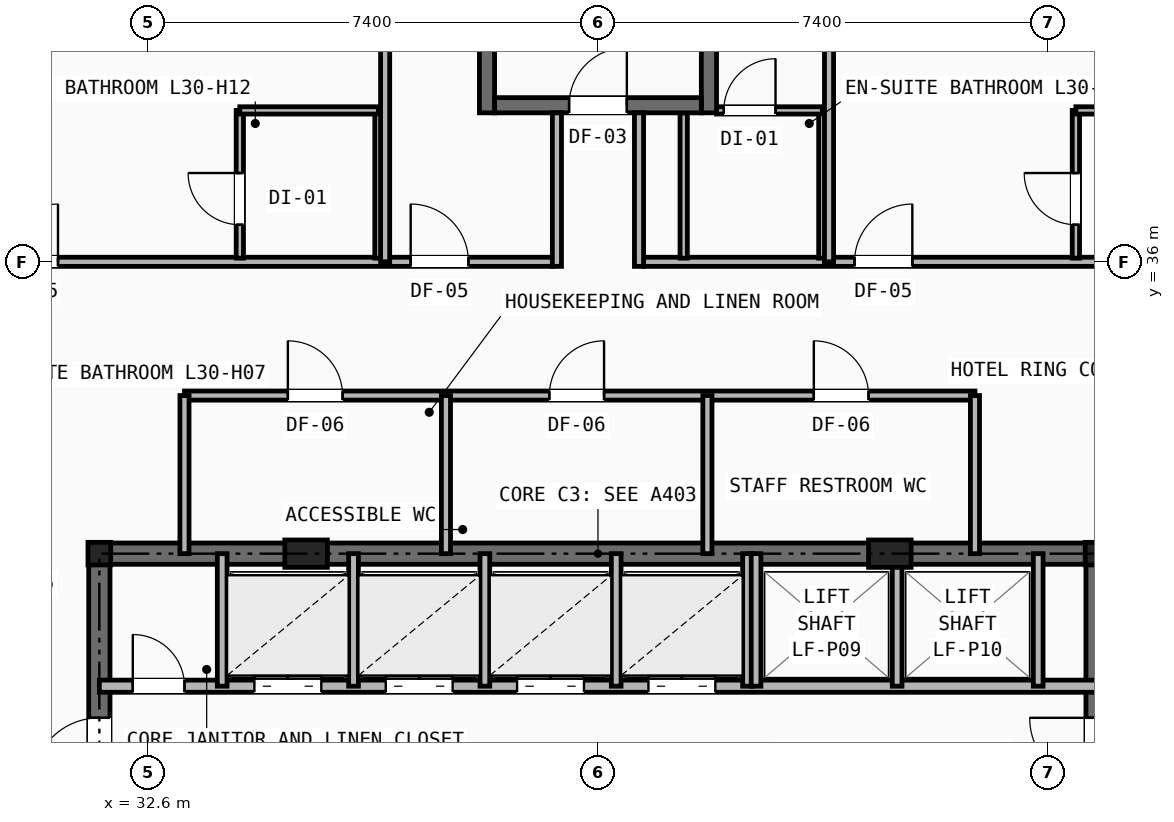
"""IFC4 building model, lengths in metres.
Left out: names, types, materials, properties, quantities, classifications, styles, units other than length and angle.
Written with IfcOpenShell. Run it as: python <this file> out.ifc"""

import sys

from ifc_helpers import new_model, si_unit, direction, frame, frame_2d, origin, origin_2d, place, context, subcontext, project, spatial, rectangle, i_section, extrude, element, fill, save


model = new_model("IFC4")
c1 = context("Model", 3, precision=1e-05, world=origin(), true_north=direction((0.0, 1.0)))
c2 = subcontext(c1, "Body", "Model", "MODEL_VIEW")
j1 = project(units=[si_unit("LENGTHUNIT", "METRE"), si_unit("PLANEANGLEUNIT", "RADIAN")], contexts=[c1])
p1 = place(None, origin())
s1 = spatial("IfcSite", under=j1, at=p1, CompositionType="ELEMENT")
p2 = place(p1, origin())
s2 = spatial("IfcBuilding", under=s1, at=p2, CompositionType="ELEMENT")
p3 = place(p2, frame((0.0, 0.0, 105.4)))
s3 = spatial("IfcBuildingStorey", under=s2, at=p3, CompositionType="ELEMENT", Elevation=105.4)
for number, where, z_axis, x_axis in (
    (1, (31.8, 31.2, 0.0), (0.0, 0.0, 1.0), (1.0, 0.0, 0.0)),
    (2, (48.2, 31.2, 0.0), (0.0, 0.0, 1.0), (1.0, 0.0, 0.0)),
):
    element("IfcColumn", number, at=place(p3, frame(where, z_axis=z_axis, x_axis=x_axis)), inside=s3, PredefinedType="COLUMN", context=c2, shape_type="SweptSolid", body=[
        extrude(i_section(OverallWidth=0.374, OverallDepth=0.372, WebThickness=0.016, FlangeThickness=0.026, at=origin_2d()), origin(), (0.0, 0.0, 1.0), 3.2),
    ])
for number, where, z_axis, x_axis in (
    (3, (35.2, 31.2, 0.0), (0.0, 0.0, 1.0), (1.0, 0.0, 0.0)),
    (4, (44.8, 31.2, 0.0), (0.0, 0.0, 1.0), (1.0, 0.0, 0.0)),
):
    element("IfcColumn", number, at=place(p3, frame(where, z_axis=z_axis, x_axis=x_axis)), inside=s3, PredefinedType="PILASTER", context=c2, shape_type="SweptSolid", body=[
        extrude(rectangle(XDim=0.7, YDim=0.45, at=origin_2d()), origin(), (0.0, 0.0, 1.0), 3.2),
    ])
p4 = place(p3, frame((31.8, 31.2, 0.0), z_axis=(0.0, 0.0, 1.0), x_axis=(1.0, 0.0, 0.0)))
e5 = element("IfcWall", 5, at=p4, inside=s3, PredefinedType="SHEAR", context=c2, shape_type="SweptSolid", body=[
    extrude(rectangle(XDim=16.4, YDim=0.35, at=frame_2d((8.2, 0.0))), origin(), (0.0, 0.0, 1.0), 2.97),
])
p5 = place(p3, frame((31.8, 16.4, 0.0), z_axis=(0.0, 0.0, 1.0), x_axis=(0.0, 1.0, 0.0)))
e6 = element("IfcWall", 6, at=p5, inside=s3, PredefinedType="SHEAR", context=c2, shape_type="SweptSolid", body=[
    extrude(rectangle(XDim=14.8, YDim=0.35, at=frame_2d((7.4, 0.0))), origin(), (0.0, 0.0, 1.0), 2.97),
])
p6 = place(p5, frame((11.0, 0.0, 0.0)))
e7 = element("IfcOpeningElement", 7, at=p6, cuts=e6, PredefinedType="OPENING", context=c2, shape_type="SweptSolid", body=[
    extrude(rectangle(XDim=1.1, YDim=2.15, at=frame_2d((0.55, 1.075))), frame((0.0, 0.185, 0.0), z_axis=(0.0, -1.0, 0.0), x_axis=(1.0, 0.0, 0.0)), (0.0, 0.0, 1.0), 0.37),
])
p7 = place(p3, frame((48.2, 16.4, 0.0), z_axis=(0.0, 0.0, 1.0), x_axis=(0.0, 1.0, 0.0)))
e8 = element("IfcWall", 8, at=p7, inside=s3, PredefinedType="SHEAR", context=c2, shape_type="SweptSolid", body=[
    extrude(rectangle(XDim=14.8, YDim=0.35, at=frame_2d((7.4, 0.0))), origin(), (0.0, 0.0, 1.0), 2.97),
])
p8 = place(p7, frame((11.0, 0.0, 0.0)))
e9 = element("IfcOpeningElement", 9, at=p8, cuts=e8, PredefinedType="OPENING", context=c2, shape_type="SweptSolid", body=[
    extrude(rectangle(XDim=1.1, YDim=2.15, at=frame_2d((0.55, 1.075))), frame((0.0, 0.185, 0.0), z_axis=(0.0, -1.0, 0.0), x_axis=(1.0, 0.0, 0.0)), (0.0, 0.0, 1.0), 0.37),
])
p9 = place(p3, frame((31.8, 29.02, 0.0), z_axis=(0.0, 0.0, 1.0), x_axis=(1.0, 0.0, 0.0)))
e10 = element("IfcWall", 10, at=p9, inside=s3, PredefinedType="SOLIDWALL", context=c2, shape_type="SweptSolid", body=[
    extrude(rectangle(XDim=16.4, YDim=0.2, at=frame_2d((8.2, 0.0))), origin(), (0.0, 0.0, 1.0), 2.421),
])
p10 = place(p9, frame((0.55, 0.0, 0.0)))
e11 = element("IfcOpeningElement", 11, at=p10, cuts=e10, PredefinedType="OPENING", context=c2, shape_type="SweptSolid", body=[
    extrude(rectangle(XDim=0.85, YDim=2.05, at=frame_2d((0.425, 1.025))), frame((0.0, 0.11, 0.0), z_axis=(0.0, -1.0, 0.0), x_axis=(1.0, 0.0, 0.0)), (0.0, 0.0, 1.0), 0.22),
])
p11 = place(p9, frame((2.55, 0.0, 0.0)))
e12 = element("IfcOpeningElement", 12, at=p11, cuts=e10, PredefinedType="OPENING", context=c2, shape_type="SweptSolid", body=[
    extrude(rectangle(XDim=1.1, YDim=2.15, at=frame_2d((0.55, 1.075))), frame((0.0, 0.11, 0.0), z_axis=(0.0, -1.0, 0.0), x_axis=(1.0, 0.0, 0.0)), (0.0, 0.0, 1.0), 0.22),
])
p12 = place(p9, frame((4.71, 0.0, 0.0)))
e13 = element("IfcOpeningElement", 13, at=p12, cuts=e10, PredefinedType="OPENING", context=c2, shape_type="SweptSolid", body=[
    extrude(rectangle(XDim=1.1, YDim=2.15, at=frame_2d((0.55, 1.075))), frame((0.0, 0.11, 0.0), z_axis=(0.0, -1.0, 0.0), x_axis=(1.0, 0.0, 0.0)), (0.0, 0.0, 1.0), 0.22),
])
p13 = place(p9, frame((6.87, 0.0, 0.0)))
e14 = element("IfcOpeningElement", 14, at=p13, cuts=e10, PredefinedType="OPENING", context=c2, shape_type="SweptSolid", body=[
    extrude(rectangle(XDim=1.1, YDim=2.15, at=frame_2d((0.55, 1.075))), frame((0.0, 0.11, 0.0), z_axis=(0.0, -1.0, 0.0), x_axis=(1.0, 0.0, 0.0)), (0.0, 0.0, 1.0), 0.22),
])
p14 = place(p9, frame((9.03, 0.0, 0.0)))
e15 = element("IfcOpeningElement", 15, at=p14, cuts=e10, PredefinedType="OPENING", context=c2, shape_type="SweptSolid", body=[
    extrude(rectangle(XDim=1.1, YDim=2.15, at=frame_2d((0.55, 1.075))), frame((0.0, 0.11, 0.0), z_axis=(0.0, -1.0, 0.0), x_axis=(1.0, 0.0, 0.0)), (0.0, 0.0, 1.0), 0.22),
])
for number, where, z_axis, x_axis in (
    (16, (33.82, 29.02, 0.0), (0.0, 0.0, 1.0), (0.0, 1.0, 0.0)),
    (17, (35.98, 29.02, 0.0), (0.0, 0.0, 1.0), (0.0, 1.0, 0.0)),
    (18, (38.14, 29.02, 0.0), (0.0, 0.0, 1.0), (0.0, 1.0, 0.0)),
    (19, (40.3, 29.02, 0.0), (0.0, 0.0, 1.0), (0.0, 1.0, 0.0)),
    (20, (42.46, 29.02, 0.0), (0.0, 0.0, 1.0), (0.0, 1.0, 0.0)),
    (21, (42.6, 29.02, 0.0), (0.0, 0.0, 1.0), (0.0, 1.0, 0.0)),
    (22, (44.92, 29.02, 0.0), (0.0, 0.0, 1.0), (0.0, 1.0, 0.0)),
    (23, (47.24, 29.02, 0.0), (0.0, 0.0, 1.0), (0.0, 1.0, 0.0)),
):
    element("IfcWall", number, at=place(p3, frame(where, z_axis=z_axis, x_axis=x_axis)), inside=s3, PredefinedType="SOLIDWALL", context=c2, shape_type="SweptSolid", body=[
        extrude(rectangle(XDim=2.18, YDim=0.16, at=frame_2d((1.09, 0.0))), origin(), (0.0, 0.0, 1.0), 2.698),
    ])
p15 = place(p3, frame((33.2, 33.8, 0.0), z_axis=(0.0, 0.0, 1.0), x_axis=(1.0, 0.0, 0.0)))
e24 = element("IfcWall", 24, at=p15, inside=s3, PredefinedType="PARTITIONING", context=c2, shape_type="SweptSolid", body=[
    extrude(rectangle(XDim=13.0, YDim=0.15, at=frame_2d((6.5, 0.0))), origin(), (0.0, 0.0, 1.0), 2.97),
])
p16 = place(p15, frame((1.7, 0.0, 0.0)))
e25 = element("IfcOpeningElement", 25, at=p16, cuts=e24, PredefinedType="OPENING", context=c2, shape_type="SweptSolid", body=[
    extrude(rectangle(XDim=0.9, YDim=2.1, at=frame_2d((0.45, 1.05))), frame((0.0, 0.085, 0.0), z_axis=(0.0, -1.0, 0.0), x_axis=(1.0, 0.0, 0.0)), (0.0, 0.0, 1.0), 0.17),
])
p17 = place(p15, frame((6.0, 0.0, 0.0)))
e26 = element("IfcOpeningElement", 26, at=p17, cuts=e24, PredefinedType="OPENING", context=c2, shape_type="SweptSolid", body=[
    extrude(rectangle(XDim=0.9, YDim=2.1, at=frame_2d((0.45, 1.05))), frame((0.0, 0.085, 0.0), z_axis=(0.0, -1.0, 0.0), x_axis=(1.0, 0.0, 0.0)), (0.0, 0.0, 1.0), 0.17),
])
p18 = place(p15, frame((10.35, 0.0, 0.0)))
e27 = element("IfcOpeningElement", 27, at=p18, cuts=e24, PredefinedType="OPENING", context=c2, shape_type="SweptSolid", body=[
    extrude(rectangle(XDim=0.9, YDim=2.1, at=frame_2d((0.45, 1.05))), frame((0.0, 0.085, 0.0), z_axis=(0.0, -1.0, 0.0), x_axis=(1.0, 0.0, 0.0)), (0.0, 0.0, 1.0), 0.17),
])
for number, where, z_axis, x_axis in (
    (28, (33.2, 31.2, 0.0), (0.0, 0.0, 1.0), (0.0, 1.0, 0.0)),
    (29, (46.2, 31.2, 0.0), (0.0, 0.0, 1.0), (0.0, 1.0, 0.0)),
    (30, (37.5, 31.2, 0.0), (0.0, 0.0, 1.0), (0.0, 1.0, 0.0)),
    (31, (41.8, 31.2, 0.0), (0.0, 0.0, 1.0), (0.0, 1.0, 0.0)),
):
    element("IfcWall", number, at=place(p3, frame(where, z_axis=z_axis, x_axis=x_axis)), inside=s3, PredefinedType="PARTITIONING", context=c2, shape_type="SweptSolid", body=[
        extrude(rectangle(XDim=2.6, YDim=0.15, at=frame_2d((1.3, 0.0))), origin(), (0.0, 0.0, 1.0), 2.698),
    ])
p19 = place(p3, frame((29.6, 36.0, 0.0), z_axis=(0.0, 0.0, 1.0), x_axis=(1.0, 0.0, 0.0)))
e32 = element("IfcWall", 32, at=p19, inside=s3, PredefinedType="PARTITIONING", context=c2, shape_type="SweptSolid", body=[
    extrude(rectangle(XDim=9.65, YDim=0.15, at=frame_2d((4.825, 0.0))), origin(), (0.0, 0.0, 1.0), 2.503),
])
p20 = place(p19, frame((0.57, 0.0, 0.0)))
e33 = element("IfcOpeningElement", 33, at=p20, cuts=e32, PredefinedType="OPENING", context=c2, shape_type="SweptSolid", body=[
    extrude(rectangle(XDim=0.95, YDim=2.1, at=frame_2d((0.475, 1.05))), frame((0.0, 0.085, 0.0), z_axis=(0.0, -1.0, 0.0), x_axis=(1.0, 0.0, 0.0)), (0.0, 0.0, 1.0), 0.17),
])
p21 = place(p19, frame((7.32, 0.0, 0.0)))
e34 = element("IfcOpeningElement", 34, at=p21, cuts=e32, PredefinedType="OPENING", context=c2, shape_type="SweptSolid", body=[
    extrude(rectangle(XDim=0.95, YDim=2.1, at=frame_2d((0.475, 1.05))), frame((0.0, 0.085, 0.0), z_axis=(0.0, -1.0, 0.0), x_axis=(1.0, 0.0, 0.0)), (0.0, 0.0, 1.0), 0.17),
])
p22 = place(p3, frame((40.75, 36.0, 0.0), z_axis=(0.0, 0.0, 1.0), x_axis=(1.0, 0.0, 0.0)))
e35 = element("IfcWall", 35, at=p22, inside=s3, PredefinedType="PARTITIONING", context=c2, shape_type="SweptSolid", body=[
    extrude(rectangle(XDim=9.65, YDim=0.15, at=frame_2d((4.825, 0.0))), origin(), (0.0, 0.0, 1.0), 2.503),
])
p23 = place(p22, frame((3.47, 0.0, 0.0)))
e36 = element("IfcOpeningElement", 36, at=p23, cuts=e35, PredefinedType="OPENING", context=c2, shape_type="SweptSolid", body=[
    extrude(rectangle(XDim=0.95, YDim=2.1, at=frame_2d((0.475, 1.05))), frame((0.0, 0.085, 0.0), z_axis=(0.0, -1.0, 0.0), x_axis=(1.0, 0.0, 0.0)), (0.0, 0.0, 1.0), 0.17),
])
p24 = place(p3, frame((34.11, 36.06, 0.0), z_axis=(0.0, 0.0, 1.0), x_axis=(0.0, 1.0, 0.0)))
e37 = element("IfcWall", 37, at=p24, inside=s3, PredefinedType="PARTITIONING", context=c2, shape_type="SweptSolid", body=[
    extrude(rectangle(XDim=2.43, YDim=0.12, at=frame_2d((1.215, 0.0))), origin(), (0.0, 0.0, 1.0), 2.97),
])
p25 = place(p24, frame((0.55, 0.0, 0.0)))
e38 = element("IfcOpeningElement", 38, at=p25, cuts=e37, PredefinedType="OPENING", context=c2, shape_type="SweptSolid", body=[
    extrude(rectangle(XDim=0.85, YDim=2.05, at=frame_2d((0.425, 1.025))), frame((0.0, 0.07, 0.0), z_axis=(0.0, -1.0, 0.0), x_axis=(1.0, 0.0, 0.0)), (0.0, 0.0, 1.0), 0.14),
])
p26 = place(p3, frame((36.39, 36.06, 0.0), z_axis=(0.0, 0.0, 1.0), x_axis=(0.0, 1.0, 0.0)))
e39 = element("IfcWall", 39, at=p26, inside=s3, PredefinedType="PARTITIONING", context=c2, shape_type="SweptSolid", body=[
    extrude(rectangle(XDim=2.43, YDim=0.12, at=frame_2d((1.215, 0.0))), origin(), (0.0, 0.0, 1.0), 2.97),
])
p27 = place(p3, frame((34.11, 38.49, 0.0), z_axis=(0.0, 0.0, 1.0), x_axis=(1.0, 0.0, 0.0)))
e40 = element("IfcWall", 40, at=p27, inside=s3, PredefinedType="PARTITIONING", context=c2, shape_type="SweptSolid", body=[
    extrude(rectangle(XDim=2.28, YDim=0.12, at=frame_2d((1.14, 0.0))), origin(), (0.0, 0.0, 1.0), 2.97),
])
p28 = place(p3, frame((36.5, 36.0, 0.0), z_axis=(0.0, 0.0, 1.0), x_axis=(0.0, 1.0, 0.0)))
e41 = element("IfcWall", 41, at=p28, inside=s3, PredefinedType="PARTITIONING", context=c2, shape_type="SweptSolid", body=[
    extrude(rectangle(XDim=17.643, YDim=0.15, at=frame_2d((8.821, 0.0))), origin(), (0.0, 0.0, 1.0), 2.258),
])
p29 = place(p3, frame((41.41, 36.06, 0.0), z_axis=(0.0, 0.0, 1.0), x_axis=(0.0, 1.0, 0.0)))
e42 = element("IfcWall", 42, at=p29, inside=s3, PredefinedType="PARTITIONING", context=c2, shape_type="SweptSolid", body=[
    extrude(rectangle(XDim=2.39, YDim=0.12, at=frame_2d((1.195, 0.0))), origin(), (0.0, 0.0, 1.0), 2.97),
])
p30 = place(p3, frame((43.69, 36.06, 0.0), z_axis=(0.0, 0.0, 1.0), x_axis=(0.0, 1.0, 0.0)))
e43 = element("IfcWall", 43, at=p30, inside=s3, PredefinedType="PARTITIONING", context=c2, shape_type="SweptSolid", body=[
    extrude(rectangle(XDim=2.43, YDim=0.12, at=frame_2d((1.215, 0.0))), origin(), (0.0, 0.0, 1.0), 2.97),
])
p31 = place(p3, frame((41.95, 38.49, 0.0), z_axis=(0.0, 0.0, 1.0), x_axis=(1.0, 0.0, 0.0)))
e44 = element("IfcWall", 44, at=p31, inside=s3, PredefinedType="PARTITIONING", context=c2, shape_type="SweptSolid", body=[
    extrude(rectangle(XDim=1.74, YDim=0.12, at=frame_2d((0.87, 0.0))), origin(), (0.0, 0.0, 1.0), 2.97),
])
p32 = place(p31, frame((0.12, 0.0, 0.0)))
e45 = element("IfcOpeningElement", 45, at=p32, cuts=e44, PredefinedType="OPENING", context=c2, shape_type="SweptSolid", body=[
    extrude(rectangle(XDim=0.85, YDim=2.05, at=frame_2d((0.425, 1.025))), frame((0.0, 0.07, 0.0), z_axis=(0.0, -1.0, 0.0), x_axis=(1.0, 0.0, 0.0)), (0.0, 0.0, 1.0), 0.14),
])
p33 = place(p3, frame((43.8, 36.0, 0.0), z_axis=(0.0, 0.0, 1.0), x_axis=(0.0, 1.0, 0.0)))
e46 = element("IfcWall", 46, at=p33, inside=s3, PredefinedType="PARTITIONING", context=c2, shape_type="SweptSolid", body=[
    extrude(rectangle(XDim=17.643, YDim=0.15, at=frame_2d((8.821, 0.0))), origin(), (0.0, 0.0, 1.0), 2.258),
])
p34 = place(p3, frame((47.86, 36.06, 0.0), z_axis=(0.0, 0.0, 1.0), x_axis=(0.0, 1.0, 0.0)))
e47 = element("IfcWall", 47, at=p34, inside=s3, PredefinedType="PARTITIONING", context=c2, shape_type="SweptSolid", body=[
    extrude(rectangle(XDim=2.43, YDim=0.12, at=frame_2d((1.215, 0.0))), origin(), (0.0, 0.0, 1.0), 2.503),
])
p35 = place(p34, frame((0.55, 0.0, 0.0)))
e48 = element("IfcOpeningElement", 48, at=p35, cuts=e47, PredefinedType="OPENING", context=c2, shape_type="SweptSolid", body=[
    extrude(rectangle(XDim=0.85, YDim=2.05, at=frame_2d((0.425, 1.025))), frame((0.0, 0.07, 0.0), z_axis=(0.0, -1.0, 0.0), x_axis=(1.0, 0.0, 0.0)), (0.0, 0.0, 1.0), 0.14),
])
p36 = place(p3, frame((47.86, 38.49, 0.0), z_axis=(0.0, 0.0, 1.0), x_axis=(1.0, 0.0, 0.0)))
e49 = element("IfcWall", 49, at=p36, inside=s3, PredefinedType="PARTITIONING", context=c2, shape_type="SweptSolid", body=[
    extrude(rectangle(XDim=2.28, YDim=0.12, at=frame_2d((1.14, 0.0))), origin(), (0.0, 0.0, 1.0), 2.503),
])
for number, where, z_axis, x_axis in (
    (50, (38.175, 38.45, 0.0), (0.0, 0.0, 1.0), (0.0, 1.0, 0.0)),
    (51, (41.825, 38.45, 0.0), (0.0, 0.0, 1.0), (0.0, 1.0, 0.0)),
):
    element("IfcWall", number, at=place(p3, frame(where, z_axis=z_axis, x_axis=x_axis)), inside=s3, PredefinedType="SHEAR", context=c2, shape_type="SweptSolid", body=[
        extrude(rectangle(XDim=8.55, YDim=0.25, at=frame_2d((4.275, 0.0))), origin(), (0.0, 0.0, 1.0), 2.97),
    ])
p37 = place(p3, frame((38.3, 38.575, 0.0), z_axis=(0.0, 0.0, 1.0), x_axis=(1.0, 0.0, 0.0)))
e52 = element("IfcWall", 52, at=p37, inside=s3, PredefinedType="SHEAR", context=c2, shape_type="SweptSolid", body=[
    extrude(rectangle(XDim=3.4, YDim=0.25, at=frame_2d((1.7, 0.0))), origin(), (0.0, 0.0, 1.0), 2.97),
])
p38 = place(p37, frame((1.225, 0.0, 0.0)))
e53 = element("IfcOpeningElement", 53, at=p38, cuts=e52, PredefinedType="OPENING", context=c2, shape_type="SweptSolid", body=[
    extrude(rectangle(XDim=0.95, YDim=2.1, at=frame_2d((0.475, 1.05))), frame((0.0, 0.135, 0.0), z_axis=(0.0, -1.0, 0.0), x_axis=(1.0, 0.0, 0.0)), (0.0, 0.0, 1.0), 0.27),
])
for number, where, z_axis, x_axis in (
    (54, (39.325, 35.925, 0.0), (0.0, 0.0, 1.0), (0.0, 1.0, 0.0)),
    (55, (40.675, 35.925, 0.0), (0.0, 0.0, 1.0), (0.0, 1.0, 0.0)),
):
    element("IfcWall", number, at=place(p3, frame(where, z_axis=z_axis, x_axis=x_axis)), inside=s3, PredefinedType="PARTITIONING", context=c2, shape_type="SweptSolid", body=[
        extrude(rectangle(XDim=2.525, YDim=0.15, at=frame_2d((1.262, 0.0))), origin(), (0.0, 0.0, 1.0), 2.97),
    ])
p39 = place(p10, origin())
e56 = element("IfcDoor", 56, at=p39, inside=s3, OperationType="SINGLE_SWING_LEFT", PredefinedType="DOOR", context=c2, shape_type="SweptSolid", body=[
    extrude(rectangle(XDim=0.85, YDim=2.05, at=frame_2d((0.425, 1.025))), frame((0.0, 0.025, 0.0), z_axis=(0.0, -1.0, 0.0), x_axis=(1.0, 0.0, 0.0)), (0.0, 0.0, 1.0), 0.05),
])
fill(e11, e56)
p40 = place(p6, origin())
e57 = element("IfcDoor", 57, at=p40, inside=s3, OperationType="SINGLE_SWING_LEFT", PredefinedType="DOOR", context=c2, shape_type="SweptSolid", body=[
    extrude(rectangle(XDim=1.1, YDim=2.15, at=frame_2d((0.55, 1.075))), frame((0.0, 0.025, 0.0), z_axis=(0.0, -1.0, 0.0), x_axis=(1.0, 0.0, 0.0)), (0.0, 0.0, 1.0), 0.05),
])
fill(e7, e57)
p41 = place(p11, origin())
e58 = element("IfcDoor", 58, at=p41, inside=s3, OperationType="DOUBLE_DOOR_SLIDING", PredefinedType="DOOR", context=c2, shape_type="SweptSolid", body=[
    extrude(rectangle(XDim=1.1, YDim=2.15, at=frame_2d((0.55, 1.075))), frame((0.0, 0.025, 0.0), z_axis=(0.0, -1.0, 0.0), x_axis=(1.0, 0.0, 0.0)), (0.0, 0.0, 1.0), 0.05),
])
fill(e12, e58)
p42 = place(p12, origin())
e59 = element("IfcDoor", 59, at=p42, inside=s3, OperationType="DOUBLE_DOOR_SLIDING", PredefinedType="DOOR", context=c2, shape_type="SweptSolid", body=[
    extrude(rectangle(XDim=1.1, YDim=2.15, at=frame_2d((0.55, 1.075))), frame((0.0, 0.025, 0.0), z_axis=(0.0, -1.0, 0.0), x_axis=(1.0, 0.0, 0.0)), (0.0, 0.0, 1.0), 0.05),
])
fill(e13, e59)
p43 = place(p13, origin())
e60 = element("IfcDoor", 60, at=p43, inside=s3, OperationType="DOUBLE_DOOR_SLIDING", PredefinedType="DOOR", context=c2, shape_type="SweptSolid", body=[
    extrude(rectangle(XDim=1.1, YDim=2.15, at=frame_2d((0.55, 1.075))), frame((0.0, 0.025, 0.0), z_axis=(0.0, -1.0, 0.0), x_axis=(1.0, 0.0, 0.0)), (0.0, 0.0, 1.0), 0.05),
])
fill(e14, e60)
p44 = place(p14, origin())
e61 = element("IfcDoor", 61, at=p44, inside=s3, OperationType="DOUBLE_DOOR_SLIDING", PredefinedType="DOOR", context=c2, shape_type="SweptSolid", body=[
    extrude(rectangle(XDim=1.1, YDim=2.15, at=frame_2d((0.55, 1.075))), frame((0.0, 0.025, 0.0), z_axis=(0.0, -1.0, 0.0), x_axis=(1.0, 0.0, 0.0)), (0.0, 0.0, 1.0), 0.05),
])
fill(e15, e61)
p45 = place(p16, origin())
e62 = element("IfcDoor", 62, at=p45, inside=s3, OperationType="SINGLE_SWING_LEFT", PredefinedType="DOOR", context=c2, shape_type="SweptSolid", body=[
    extrude(rectangle(XDim=0.9, YDim=2.1, at=frame_2d((0.45, 1.05))), frame((0.0, 0.025, 0.0), z_axis=(0.0, -1.0, 0.0), x_axis=(1.0, 0.0, 0.0)), (0.0, 0.0, 1.0), 0.05),
])
fill(e25, e62)
p46 = place(p17, origin())
e63 = element("IfcDoor", 63, at=p46, inside=s3, OperationType="SINGLE_SWING_RIGHT", PredefinedType="DOOR", context=c2, shape_type="SweptSolid", body=[
    extrude(rectangle(XDim=0.9, YDim=2.1, at=frame_2d((0.45, 1.05))), frame((0.0, 0.025, 0.0), z_axis=(0.0, -1.0, 0.0), x_axis=(1.0, 0.0, 0.0)), (0.0, 0.0, 1.0), 0.05),
])
fill(e26, e63)
p47 = place(p18, origin())
e64 = element("IfcDoor", 64, at=p47, inside=s3, OperationType="SINGLE_SWING_LEFT", PredefinedType="DOOR", context=c2, shape_type="SweptSolid", body=[
    extrude(rectangle(XDim=0.9, YDim=2.1, at=frame_2d((0.45, 1.05))), frame((0.0, 0.025, 0.0), z_axis=(0.0, -1.0, 0.0), x_axis=(1.0, 0.0, 0.0)), (0.0, 0.0, 1.0), 0.05),
])
fill(e27, e64)
p48 = place(p20, origin())
e65 = element("IfcDoor", 65, at=p48, inside=s3, OperationType="SINGLE_SWING_RIGHT", PredefinedType="DOOR", context=c2, shape_type="SweptSolid", body=[
    extrude(rectangle(XDim=0.95, YDim=2.1, at=frame_2d((0.475, 1.05))), frame((0.0, 0.025, 0.0), z_axis=(0.0, -1.0, 0.0), x_axis=(1.0, 0.0, 0.0)), (0.0, 0.0, 1.0), 0.05),
])
fill(e33, e65)
p49 = place(p25, origin())
e66 = element("IfcDoor", 66, at=p49, inside=s3, OperationType="SINGLE_SWING_RIGHT", PredefinedType="DOOR", context=c2, shape_type="SweptSolid", body=[
    extrude(rectangle(XDim=0.85, YDim=2.05, at=frame_2d((0.425, 1.025))), frame((0.0, 0.025, 0.0), z_axis=(0.0, -1.0, 0.0), x_axis=(1.0, 0.0, 0.0)), (0.0, 0.0, 1.0), 0.05),
])
fill(e38, e66)
p50 = place(p21, origin())
e67 = element("IfcDoor", 67, at=p50, inside=s3, OperationType="SINGLE_SWING_LEFT", PredefinedType="DOOR", context=c2, shape_type="SweptSolid", body=[
    extrude(rectangle(XDim=0.95, YDim=2.1, at=frame_2d((0.475, 1.05))), frame((0.0, 0.025, 0.0), z_axis=(0.0, -1.0, 0.0), x_axis=(1.0, 0.0, 0.0)), (0.0, 0.0, 1.0), 0.05),
])
fill(e34, e67)
p51 = place(p32, origin())
e68 = element("IfcDoor", 68, at=p51, inside=s3, OperationType="SINGLE_SWING_RIGHT", PredefinedType="DOOR", context=c2, shape_type="SweptSolid", body=[
    extrude(rectangle(XDim=0.85, YDim=2.05, at=frame_2d((0.425, 1.025))), frame((0.0, 0.025, 0.0), z_axis=(0.0, -1.0, 0.0), x_axis=(1.0, 0.0, 0.0)), (0.0, 0.0, 1.0), 0.05),
])
fill(e45, e68)
p52 = place(p23, origin())
e69 = element("IfcDoor", 69, at=p52, inside=s3, OperationType="SINGLE_SWING_RIGHT", PredefinedType="DOOR", context=c2, shape_type="SweptSolid", body=[
    extrude(rectangle(XDim=0.95, YDim=2.1, at=frame_2d((0.475, 1.05))), frame((0.0, 0.025, 0.0), z_axis=(0.0, -1.0, 0.0), x_axis=(1.0, 0.0, 0.0)), (0.0, 0.0, 1.0), 0.05),
])
fill(e36, e69)
p53 = place(p35, origin())
e70 = element("IfcDoor", 70, at=p53, inside=s3, OperationType="SINGLE_SWING_RIGHT", PredefinedType="DOOR", context=c2, shape_type="SweptSolid", body=[
    extrude(rectangle(XDim=0.85, YDim=2.05, at=frame_2d((0.425, 1.025))), frame((0.0, 0.025, 0.0), z_axis=(0.0, -1.0, 0.0), x_axis=(1.0, 0.0, 0.0)), (0.0, 0.0, 1.0), 0.05),
])
fill(e48, e70)
p54 = place(p38, origin())
e71 = element("IfcDoor", 71, at=p54, inside=s3, OperationType="SINGLE_SWING_RIGHT", PredefinedType="DOOR", context=c2, shape_type="SweptSolid", body=[
    extrude(rectangle(XDim=0.95, YDim=2.1, at=frame_2d((0.475, 1.05))), frame((0.0, 0.025, 0.0), z_axis=(0.0, -1.0, 0.0), x_axis=(1.0, 0.0, 0.0)), (0.0, 0.0, 1.0), 0.05),
])
fill(e53, e71)
save(model, sys.argv[1])
